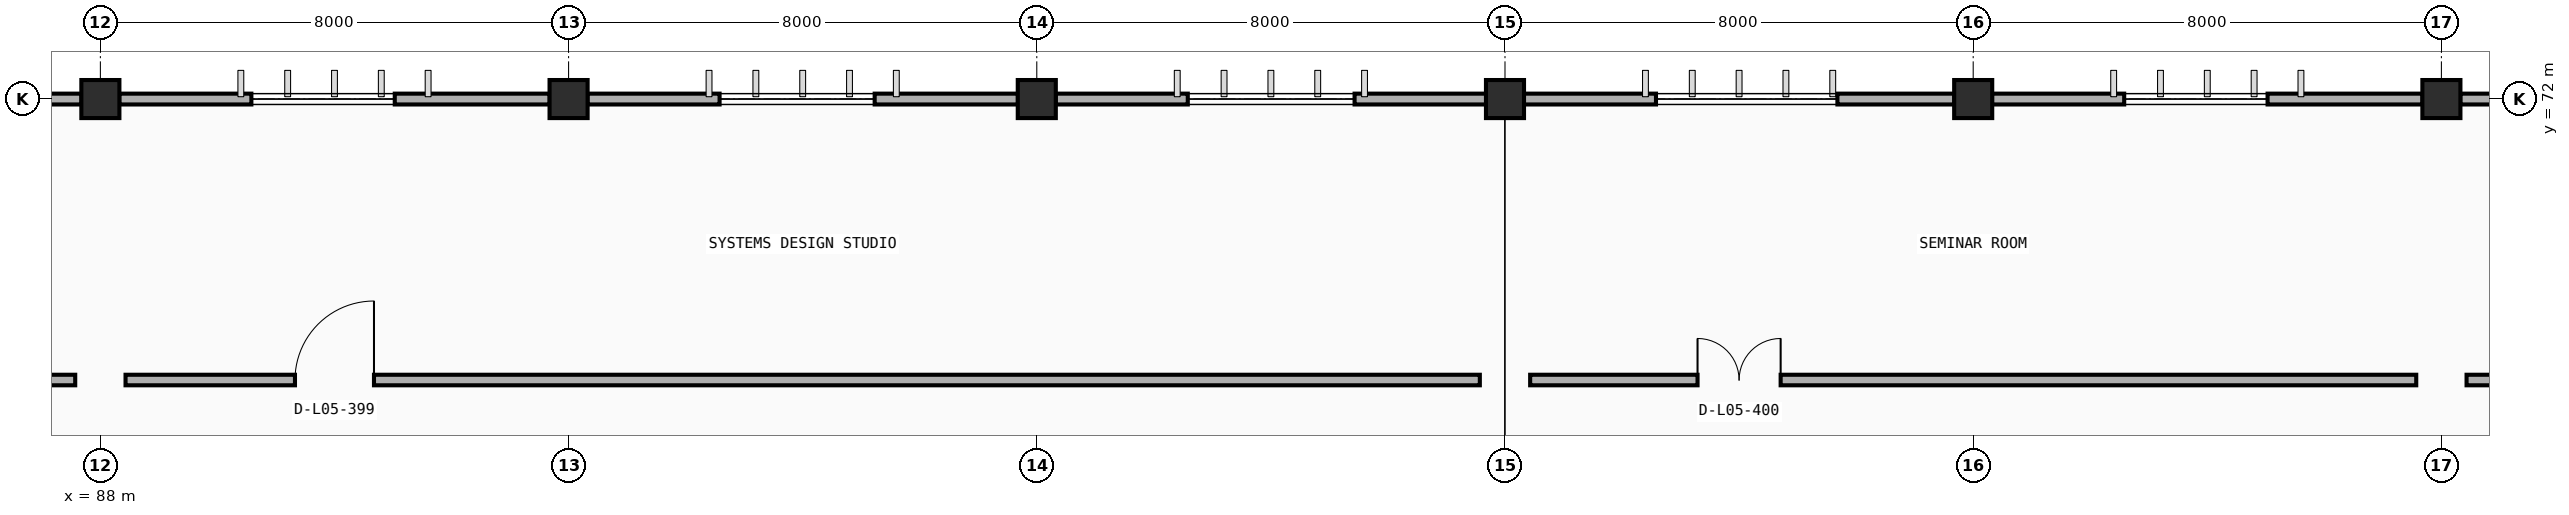
"""IFC4 building model, lengths in metres.
Left out: names, types, materials, properties, quantities, classifications, styles, units other than length and angle.
Written with IfcOpenShell. Run it as: python <this file> out.ifc"""

import sys

from ifc_helpers import new_model, si_unit, direction, frame, frame_2d, origin, origin_2d, place, context, subcontext, project, spatial, rectangle, extrude, element, fill, save


model = new_model("IFC4")
c1 = context("Model", 3, precision=1e-05, world=origin(), true_north=direction((0.0, 1.0)))
c2 = subcontext(c1, "Body", "Model", "MODEL_VIEW")
j1 = project(units=[si_unit("LENGTHUNIT", "METRE"), si_unit("PLANEANGLEUNIT", "RADIAN")], contexts=[c1])
p1 = place(None, origin())
s1 = spatial("IfcSite", under=j1, at=p1, CompositionType="ELEMENT")
p2 = place(p1, origin())
s2 = spatial("IfcBuilding", under=s1, at=p2, CompositionType="ELEMENT")
p3 = place(p2, frame((0.0, 0.0, 18.0)))
s3 = spatial("IfcBuildingStorey", under=s2, at=p3, CompositionType="ELEMENT", Elevation=18.0)
for number, where, z_axis, x_axis in (
    (1, (88.0, 72.0, 0.0), (0.0, 0.0, 1.0), (1.0, 0.0, 0.0)),
    (2, (96.0, 72.0, 0.0), (0.0, 0.0, 1.0), (1.0, 0.0, 0.0)),
    (3, (104.0, 72.0, 0.0), (0.0, 0.0, 1.0), (1.0, 0.0, 0.0)),
    (4, (112.0, 72.0, 0.0), (0.0, 0.0, 1.0), (1.0, 0.0, 0.0)),
    (5, (120.0, 72.0, 0.0), (0.0, 0.0, 1.0), (1.0, 0.0, 0.0)),
    (6, (128.0, 72.0, 0.0), (0.0, 0.0, 1.0), (1.0, 0.0, 0.0)),
):
    element("IfcColumn", number, at=place(p3, frame(where, z_axis=z_axis, x_axis=x_axis)), inside=s3, PredefinedType="COLUMN", context=c2, shape_type="SweptSolid", body=[
        extrude(rectangle(XDim=0.65, YDim=0.65, at=origin_2d()), origin(), (0.0, 0.0, 1.0), 4.2),
    ])
p4 = place(p3, frame((80.322, 72.0, 0.0), z_axis=(0.0, 0.0, 1.0), x_axis=(1.0, 0.0, 0.0)))
e7 = element("IfcWall", 7, at=p4, inside=s3, PredefinedType="STANDARD", context=c2, shape_type="SweptSolid", body=[
    extrude(rectangle(XDim=7.356, YDim=0.185, at=frame_2d((3.678, 0.0))), origin(), (0.0, 0.0, 1.0), 3.335),
])
p5 = place(p4, frame((2.258, 0.0, 0.9)))
e8 = element("IfcOpeningElement", 8, at=p5, cuts=e7, PredefinedType="OPENING", context=c2, shape_type="SweptSolid", body=[
    extrude(rectangle(XDim=3.1, YDim=1.6, at=frame_2d((1.55, 0.8))), frame((0.0, 0.103, 0.0), z_axis=(0.0, -1.0, 0.0), x_axis=(1.0, 0.0, 0.0)), (0.0, 0.0, 1.0), 0.205),
])
p6 = place(p3, frame((88.322, 72.0, 0.0), z_axis=(0.0, 0.0, 1.0), x_axis=(1.0, 0.0, 0.0)))
e9 = element("IfcWall", 9, at=p6, inside=s3, PredefinedType="STANDARD", context=c2, shape_type="SweptSolid", body=[
    extrude(rectangle(XDim=7.356, YDim=0.185, at=frame_2d((3.678, 0.0))), origin(), (0.0, 0.0, 1.0), 3.335),
])
p7 = place(p6, frame((2.258, 0.0, 0.9)))
e10 = element("IfcOpeningElement", 10, at=p7, cuts=e9, PredefinedType="OPENING", context=c2, shape_type="SweptSolid", body=[
    extrude(rectangle(XDim=2.45, YDim=2.0, at=frame_2d((1.225, 1.0))), frame((0.0, 0.103, 0.0), z_axis=(0.0, -1.0, 0.0), x_axis=(1.0, 0.0, 0.0)), (0.0, 0.0, 1.0), 0.205),
])
p8 = place(p3, frame((96.322, 72.0, 0.0), z_axis=(0.0, 0.0, 1.0), x_axis=(1.0, 0.0, 0.0)))
e11 = element("IfcWall", 11, at=p8, inside=s3, PredefinedType="STANDARD", context=c2, shape_type="SweptSolid", body=[
    extrude(rectangle(XDim=7.356, YDim=0.185, at=frame_2d((3.678, 0.0))), origin(), (0.0, 0.0, 1.0), 3.335),
])
p9 = place(p8, frame((2.258, 0.0, 0.9)))
e12 = element("IfcOpeningElement", 12, at=p9, cuts=e11, PredefinedType="OPENING", context=c2, shape_type="SweptSolid", body=[
    extrude(rectangle(XDim=2.65, YDim=2.0, at=frame_2d((1.325, 1.0))), frame((0.0, 0.103, 0.0), z_axis=(0.0, -1.0, 0.0), x_axis=(1.0, 0.0, 0.0)), (0.0, 0.0, 1.0), 0.205),
])
p10 = place(p3, frame((104.322, 72.0, 0.0), z_axis=(0.0, 0.0, 1.0), x_axis=(1.0, 0.0, 0.0)))
e13 = element("IfcWall", 13, at=p10, inside=s3, PredefinedType="STANDARD", context=c2, shape_type="SweptSolid", body=[
    extrude(rectangle(XDim=7.356, YDim=0.185, at=frame_2d((3.678, 0.0))), origin(), (0.0, 0.0, 1.0), 3.335),
])
p11 = place(p10, frame((2.258, 0.0, 0.9)))
e14 = element("IfcOpeningElement", 14, at=p11, cuts=e13, PredefinedType="OPENING", context=c2, shape_type="SweptSolid", body=[
    extrude(rectangle(XDim=2.85, YDim=2.0, at=frame_2d((1.425, 1.0))), frame((0.0, 0.103, 0.0), z_axis=(0.0, -1.0, 0.0), x_axis=(1.0, 0.0, 0.0)), (0.0, 0.0, 1.0), 0.205),
])
p12 = place(p3, frame((112.322, 72.0, 0.0), z_axis=(0.0, 0.0, 1.0), x_axis=(1.0, 0.0, 0.0)))
e15 = element("IfcWall", 15, at=p12, inside=s3, PredefinedType="STANDARD", context=c2, shape_type="SweptSolid", body=[
    extrude(rectangle(XDim=7.356, YDim=0.185, at=frame_2d((3.678, 0.0))), origin(), (0.0, 0.0, 1.0), 3.335),
])
p13 = place(p12, frame((2.258, 0.0, 0.9)))
e16 = element("IfcOpeningElement", 16, at=p13, cuts=e15, PredefinedType="OPENING", context=c2, shape_type="SweptSolid", body=[
    extrude(rectangle(XDim=3.1, YDim=1.6, at=frame_2d((1.55, 0.8))), frame((0.0, 0.103, 0.0), z_axis=(0.0, -1.0, 0.0), x_axis=(1.0, 0.0, 0.0)), (0.0, 0.0, 1.0), 0.205),
])
p14 = place(p3, frame((120.322, 72.0, 0.0), z_axis=(0.0, 0.0, 1.0), x_axis=(1.0, 0.0, 0.0)))
e17 = element("IfcWall", 17, at=p14, inside=s3, PredefinedType="STANDARD", context=c2, shape_type="SweptSolid", body=[
    extrude(rectangle(XDim=7.356, YDim=0.185, at=frame_2d((3.678, 0.0))), origin(), (0.0, 0.0, 1.0), 3.335),
])
p15 = place(p14, frame((2.258, 0.0, 0.9)))
e18 = element("IfcOpeningElement", 18, at=p15, cuts=e17, PredefinedType="OPENING", context=c2, shape_type="SweptSolid", body=[
    extrude(rectangle(XDim=2.45, YDim=2.0, at=frame_2d((1.225, 1.0))), frame((0.0, 0.103, 0.0), z_axis=(0.0, -1.0, 0.0), x_axis=(1.0, 0.0, 0.0)), (0.0, 0.0, 1.0), 0.205),
])
p16 = place(p3, frame((128.322, 72.0, 0.0), z_axis=(0.0, 0.0, 1.0), x_axis=(1.0, 0.0, 0.0)))
e19 = element("IfcWall", 19, at=p16, inside=s3, PredefinedType="STANDARD", context=c2, shape_type="SweptSolid", body=[
    extrude(rectangle(XDim=7.356, YDim=0.185, at=frame_2d((3.678, 0.0))), origin(), (0.0, 0.0, 1.0), 3.335),
])
p17 = place(p16, frame((2.258, 0.0, 0.9)))
e20 = element("IfcOpeningElement", 20, at=p17, cuts=e19, PredefinedType="OPENING", context=c2, shape_type="SweptSolid", body=[
    extrude(rectangle(XDim=2.65, YDim=2.0, at=frame_2d((1.325, 1.0))), frame((0.0, 0.103, 0.0), z_axis=(0.0, -1.0, 0.0), x_axis=(1.0, 0.0, 0.0)), (0.0, 0.0, 1.0), 0.205),
])
p18 = place(p3, frame((56.43, 67.2, 0.0), z_axis=(0.0, 0.0, 1.0), x_axis=(1.0, 0.0, 0.0)))
e21 = element("IfcWall", 21, at=p18, inside=s3, PredefinedType="PARTITIONING", context=c2, shape_type="SweptSolid", body=[
    extrude(rectangle(XDim=31.14, YDim=0.18, at=frame_2d((15.57, 0.0))), origin(), (0.0, 0.0, 1.0), 3.3),
])
p19 = place(p18, frame((2.66, 0.0, 0.0)))
e22 = element("IfcOpeningElement", 22, at=p19, cuts=e21, PredefinedType="OPENING", context=c2, shape_type="SweptSolid", body=[
    extrude(rectangle(XDim=1.82, YDim=2.25, at=frame_2d((0.91, 1.125))), frame((0.0, 0.1, 0.0), z_axis=(0.0, -1.0, 0.0), x_axis=(1.0, 0.0, 0.0)), (0.0, 0.0, 1.0), 0.2),
])
p20 = place(p3, frame((88.43, 67.2, 0.0), z_axis=(0.0, 0.0, 1.0), x_axis=(1.0, 0.0, 0.0)))
e23 = element("IfcWall", 23, at=p20, inside=s3, PredefinedType="PARTITIONING", context=c2, shape_type="SweptSolid", body=[
    extrude(rectangle(XDim=23.14, YDim=0.18, at=frame_2d((11.57, 0.0))), origin(), (0.0, 0.0, 1.0), 3.3),
])
p21 = place(p20, frame((2.895, 0.0, 0.0)))
e24 = element("IfcOpeningElement", 24, at=p21, cuts=e23, PredefinedType="OPENING", context=c2, shape_type="SweptSolid", body=[
    extrude(rectangle(XDim=1.35, YDim=2.2, at=frame_2d((0.675, 1.1))), frame((0.0, 0.1, 0.0), z_axis=(0.0, -1.0, 0.0), x_axis=(1.0, 0.0, 0.0)), (0.0, 0.0, 1.0), 0.2),
])
p22 = place(p3, frame((112.43, 67.2, 0.0), z_axis=(0.0, 0.0, 1.0), x_axis=(1.0, 0.0, 0.0)))
e25 = element("IfcWall", 25, at=p22, inside=s3, PredefinedType="PARTITIONING", context=c2, shape_type="SweptSolid", body=[
    extrude(rectangle(XDim=15.14, YDim=0.18, at=frame_2d((7.57, 0.0))), origin(), (0.0, 0.0, 1.0), 3.3),
])
p23 = place(p22, frame((2.86, 0.0, 0.0)))
e26 = element("IfcOpeningElement", 26, at=p23, cuts=e25, PredefinedType="OPENING", context=c2, shape_type="SweptSolid", body=[
    extrude(rectangle(XDim=1.42, YDim=2.2, at=frame_2d((0.71, 1.1))), frame((0.0, 0.1, 0.0), z_axis=(0.0, -1.0, 0.0), x_axis=(1.0, 0.0, 0.0)), (0.0, 0.0, 1.0), 0.2),
])
p24 = place(p3, frame((128.43, 67.2, 0.0), z_axis=(0.0, 0.0, 1.0), x_axis=(1.0, 0.0, 0.0)))
e27 = element("IfcWall", 27, at=p24, inside=s3, PredefinedType="PARTITIONING", context=c2, shape_type="SweptSolid", body=[
    extrude(rectangle(XDim=23.14, YDim=0.18, at=frame_2d((11.57, 0.0))), origin(), (0.0, 0.0, 1.0), 3.3),
])
p25 = place(p24, frame((2.995, 0.0, 0.0)))
e28 = element("IfcOpeningElement", 28, at=p25, cuts=e27, PredefinedType="OPENING", context=c2, shape_type="SweptSolid", body=[
    extrude(rectangle(XDim=1.15, YDim=2.15, at=frame_2d((0.575, 1.075))), frame((0.0, 0.1, 0.0), z_axis=(0.0, -1.0, 0.0), x_axis=(1.0, 0.0, 0.0)), (0.0, 0.0, 1.0), 0.2),
])
p26 = place(p7, origin())
e29 = element("IfcWindow", 29, at=p26, inside=s3, PartitioningType="DOUBLE_PANEL_VERTICAL", PredefinedType="WINDOW", context=c2, shape_type="SweptSolid", body=[
    extrude(rectangle(XDim=2.45, YDim=2.0, at=frame_2d((1.225, 1.0))), frame((0.0, 0.03, 0.0), z_axis=(0.0, -1.0, 0.0), x_axis=(1.0, 0.0, 0.0)), (0.0, 0.0, 1.0), 0.06),
])
fill(e10, e29)
p27 = place(p9, origin())
e30 = element("IfcWindow", 30, at=p27, inside=s3, PartitioningType="DOUBLE_PANEL_VERTICAL", PredefinedType="WINDOW", context=c2, shape_type="SweptSolid", body=[
    extrude(rectangle(XDim=2.65, YDim=2.0, at=frame_2d((1.325, 1.0))), frame((0.0, 0.03, 0.0), z_axis=(0.0, -1.0, 0.0), x_axis=(1.0, 0.0, 0.0)), (0.0, 0.0, 1.0), 0.06),
])
fill(e12, e30)
p28 = place(p11, origin())
e31 = element("IfcWindow", 31, at=p28, inside=s3, PartitioningType="DOUBLE_PANEL_VERTICAL", PredefinedType="WINDOW", context=c2, shape_type="SweptSolid", body=[
    extrude(rectangle(XDim=2.85, YDim=2.0, at=frame_2d((1.425, 1.0))), frame((0.0, 0.03, 0.0), z_axis=(0.0, -1.0, 0.0), x_axis=(1.0, 0.0, 0.0)), (0.0, 0.0, 1.0), 0.06),
])
fill(e14, e31)
p29 = place(p13, origin())
e32 = element("IfcWindow", 32, at=p29, inside=s3, PartitioningType="DOUBLE_PANEL_VERTICAL", PredefinedType="WINDOW", context=c2, shape_type="SweptSolid", body=[
    extrude(rectangle(XDim=3.1, YDim=1.6, at=frame_2d((1.55, 0.8))), frame((0.0, 0.03, 0.0), z_axis=(0.0, -1.0, 0.0), x_axis=(1.0, 0.0, 0.0)), (0.0, 0.0, 1.0), 0.06),
])
fill(e16, e32)
p30 = place(p15, origin())
e33 = element("IfcWindow", 33, at=p30, inside=s3, PartitioningType="DOUBLE_PANEL_VERTICAL", PredefinedType="WINDOW", context=c2, shape_type="SweptSolid", body=[
    extrude(rectangle(XDim=2.45, YDim=2.0, at=frame_2d((1.225, 1.0))), frame((0.0, 0.03, 0.0), z_axis=(0.0, -1.0, 0.0), x_axis=(1.0, 0.0, 0.0)), (0.0, 0.0, 1.0), 0.06),
])
fill(e18, e33)
p31 = place(p21, origin())
e34 = element("IfcDoor", 34, at=p31, inside=s3, OperationType="SINGLE_SWING_RIGHT", PredefinedType="DOOR", context=c2, shape_type="SweptSolid", body=[
    extrude(rectangle(XDim=1.35, YDim=2.2, at=frame_2d((0.675, 1.1))), frame((0.0, 0.025, 0.0), z_axis=(0.0, -1.0, 0.0), x_axis=(1.0, 0.0, 0.0)), (0.0, 0.0, 1.0), 0.05),
])
fill(e24, e34)
p32 = place(p23, origin())
e35 = element("IfcDoor", 35, at=p32, inside=s3, OperationType="DOUBLE_DOOR_SINGLE_SWING", PredefinedType="DOOR", context=c2, shape_type="SweptSolid", body=[
    extrude(rectangle(XDim=1.42, YDim=2.2, at=frame_2d((0.71, 1.1))), frame((0.0, 0.025, 0.0), z_axis=(0.0, -1.0, 0.0), x_axis=(1.0, 0.0, 0.0)), (0.0, 0.0, 1.0), 0.05),
])
fill(e26, e35)
save(model, sys.argv[1])
